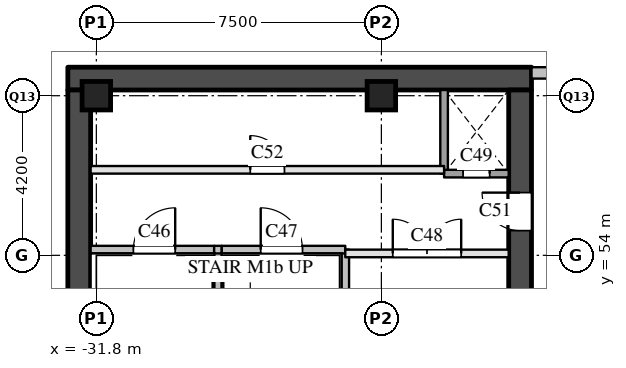
"""IFC4 building model, lengths in metres.
Left out: names, types, materials, properties, quantities, classifications, styles, units other than length and angle.
Written with IfcOpenShell. Run it as: python <this file> out.ifc"""

import sys

from ifc_helpers import new_model, si_unit, direction, frame, frame_2d, origin, origin_2d, place, context, subcontext, project, spatial, rectangle, extrude, element, fill, save


model = new_model("IFC4")
c1 = context("Model", 3, precision=1e-05, world=origin(), true_north=direction((0.0, 1.0)))
c2 = subcontext(c1, "Body", "Model", "MODEL_VIEW")
j1 = project(units=[si_unit("LENGTHUNIT", "METRE"), si_unit("PLANEANGLEUNIT", "RADIAN")], contexts=[c1])
p1 = place(None, origin())
s1 = spatial("IfcSite", under=j1, at=p1, CompositionType="ELEMENT")
p2 = place(p1, origin())
s2 = spatial("IfcBuilding", under=s1, at=p2, CompositionType="ELEMENT")
p3 = place(p2, frame((0.0, 0.0, 21.0)))
s3 = spatial("IfcBuildingStorey", under=s2, at=p3, CompositionType="ELEMENT", Elevation=21.0)
for number, where, z_axis, x_axis in (
    (1, (-31.8, 58.2, 0.0), (0.0, 0.0, 1.0), (1.0, 0.0, 0.0)),
    (2, (-24.3, 58.2, 0.0), (0.0, 0.0, 1.0), (1.0, 0.0, 0.0)),
):
    element("IfcColumn", number, at=place(p3, frame(where, z_axis=z_axis, x_axis=x_axis)), inside=s3, PredefinedType="COLUMN", context=c2, shape_type="SweptSolid", body=[
        extrude(rectangle(XDim=0.75, YDim=0.75, at=origin_2d()), origin(), (0.0, 0.0, 1.0), 5.0),
    ])
p4 = place(p3, frame((-16.8, 58.8, 0.0), z_axis=(0.0, 0.0, 1.0), x_axis=(-1.0, 0.0, 0.0)))
e3 = element("IfcWall", 3, at=p4, inside=s3, PredefinedType="SOLIDWALL", context=c2, shape_type="SweptSolid", body=[
    extrude(rectangle(XDim=3.55, YDim=0.3, at=frame_2d((1.775, 0.0))), origin(), (0.0, 0.0, 1.0), 4.59),
])
p5 = place(p3, frame((-32.55, 58.65, 0.0), z_axis=(0.0, 0.0, 1.0), x_axis=(1.0, 0.0, 0.0)))
e4 = element("IfcWall", 4, at=p5, inside=s3, PredefinedType="SHEAR", context=c2, shape_type="SweptSolid", body=[
    extrude(rectangle(XDim=12.2, YDim=0.6, at=frame_2d((6.1, 0.0))), origin(), (0.0, 0.0, 1.0), 4.55),
])
p6 = place(p3, frame((-32.25, 47.95, 0.0), z_axis=(0.0, 0.0, 1.0), x_axis=(0.0, 1.0, 0.0)))
e5 = element("IfcWall", 5, at=p6, inside=s3, PredefinedType="SHEAR", context=c2, shape_type="SweptSolid", body=[
    extrude(rectangle(XDim=10.4, YDim=0.6, at=frame_2d((5.2, 0.0))), origin(), (0.0, 0.0, 1.0), 4.55),
])
p7 = place(p3, frame((-20.65, 47.95, 0.0), z_axis=(0.0, 0.0, 1.0), x_axis=(0.0, 1.0, 0.0)))
e6 = element("IfcWall", 6, at=p7, inside=s3, PredefinedType="SHEAR", context=c2, shape_type="SweptSolid", body=[
    extrude(rectangle(XDim=10.4, YDim=0.6, at=frame_2d((5.2, 0.0))), origin(), (0.0, 0.0, 1.0), 4.55),
])
p8 = place(p7, frame((6.7, 0.0, 0.0)))
e7 = element("IfcOpeningElement", 7, at=p8, cuts=e6, PredefinedType="OPENING", context=c2, shape_type="SweptSolid", body=[
    extrude(rectangle(XDim=1.0, YDim=2.1, at=frame_2d((0.5, 1.05))), frame((0.0, 0.31, 0.0), z_axis=(0.0, -1.0, 0.0), x_axis=(1.0, 0.0, 0.0)), (0.0, 0.0, 1.0), 0.62),
])
for number, where, z_axis, x_axis in (
    (8, (-28.6, 52.55, 0.0), (0.0, 0.0, 1.0), (0.0, 1.0, 0.0)),
    (9, (-25.25, 52.55, 0.0), (0.0, 0.0, 1.0), (0.0, 1.0, 0.0)),
):
    element("IfcWall", number, at=place(p3, frame(where, z_axis=z_axis, x_axis=x_axis)), inside=s3, PredefinedType="SOLIDWALL", context=c2, shape_type="SweptSolid", body=[
        extrude(rectangle(XDim=1.6, YDim=0.2, at=frame_2d((0.8, 0.0))), origin(), (0.0, 0.0, 1.0), 4.55),
    ])
p9 = place(p3, frame((-22.65, 56.15, 0.0), z_axis=(0.0, 0.0, 1.0), x_axis=(0.0, 1.0, 0.0)))
e10 = element("IfcWall", 10, at=p9, inside=s3, PredefinedType="SOLIDWALL", context=c2, shape_type="SweptSolid", body=[
    extrude(rectangle(XDim=2.2, YDim=0.2, at=frame_2d((1.1, 0.0))), origin(), (0.0, 0.0, 1.0), 4.55),
])
p10 = place(p3, frame((-25.25, 54.05, 0.0), z_axis=(0.0, 0.0, 1.0), x_axis=(1.0, 0.0, 0.0)))
e11 = element("IfcWall", 11, at=p10, inside=s3, PredefinedType="PARTITIONING", context=c2, shape_type="SweptSolid", body=[
    extrude(rectangle(XDim=4.3, YDim=0.2, at=frame_2d((2.15, 0.0))), origin(), (0.0, 0.0, 1.0), 4.55),
])
p11 = place(p10, frame((1.25, 0.0, 0.0)))
e12 = element("IfcOpeningElement", 12, at=p11, cuts=e11, PredefinedType="OPENING", context=c2, shape_type="SweptSolid", body=[
    extrude(rectangle(XDim=1.8, YDim=2.1, at=frame_2d((0.9, 1.05))), frame((0.0, 0.11, 0.0), z_axis=(0.0, -1.0, 0.0), x_axis=(1.0, 0.0, 0.0)), (0.0, 0.0, 1.0), 0.22),
])
p12 = place(p3, frame((-31.95, 54.15, 0.0), z_axis=(0.0, 0.0, 1.0), x_axis=(1.0, 0.0, 0.0)))
e13 = element("IfcWall", 13, at=p12, inside=s3, PredefinedType="SOLIDWALL", context=c2, shape_type="SweptSolid", body=[
    extrude(rectangle(XDim=3.25, YDim=0.2, at=frame_2d((1.625, 0.0))), origin(), (0.0, 0.0, 1.0), 4.55),
])
p13 = place(p12, frame((1.125, 0.0, 0.0)))
e14 = element("IfcOpeningElement", 14, at=p13, cuts=e13, PredefinedType="OPENING", context=c2, shape_type="SweptSolid", body=[
    extrude(rectangle(XDim=1.1, YDim=2.1, at=frame_2d((0.55, 1.05))), frame((0.0, 0.11, 0.0), z_axis=(0.0, -1.0, 0.0), x_axis=(1.0, 0.0, 0.0)), (0.0, 0.0, 1.0), 0.22),
])
p14 = place(p3, frame((-28.7, 54.15, 0.0), z_axis=(0.0, 0.0, 1.0), x_axis=(1.0, 0.0, 0.0)))
e15 = element("IfcWall", 15, at=p14, inside=s3, PredefinedType="SOLIDWALL", context=c2, shape_type="SweptSolid", body=[
    extrude(rectangle(XDim=0.2, YDim=0.2, at=frame_2d((0.1, 0.0))), origin(), (0.0, 0.0, 1.0), 4.55),
])
p15 = place(p3, frame((-28.5, 54.15, 0.0), z_axis=(0.0, 0.0, 1.0), x_axis=(1.0, 0.0, 0.0)))
e16 = element("IfcWall", 16, at=p15, inside=s3, PredefinedType="SOLIDWALL", context=c2, shape_type="SweptSolid", body=[
    extrude(rectangle(XDim=3.25, YDim=0.2, at=frame_2d((1.625, 0.0))), origin(), (0.0, 0.0, 1.0), 4.55),
])
p16 = place(p15, frame((1.025, 0.0, 0.0)))
e17 = element("IfcOpeningElement", 17, at=p16, cuts=e16, PredefinedType="OPENING", context=c2, shape_type="SweptSolid", body=[
    extrude(rectangle(XDim=1.1, YDim=2.1, at=frame_2d((0.55, 1.05))), frame((0.0, 0.11, 0.0), z_axis=(0.0, -1.0, 0.0), x_axis=(1.0, 0.0, 0.0)), (0.0, 0.0, 1.0), 0.22),
])
p17 = place(p3, frame((-31.95, 56.25, 0.0), z_axis=(0.0, 0.0, 1.0), x_axis=(1.0, 0.0, 0.0)))
e18 = element("IfcWall", 18, at=p17, inside=s3, PredefinedType="PARTITIONING", context=c2, shape_type="SweptSolid", body=[
    extrude(rectangle(XDim=9.3, YDim=0.2, at=frame_2d((4.65, 0.0))), origin(), (0.0, 0.0, 1.0), 4.55),
])
p18 = place(p17, frame((4.2, 0.0, 0.0)))
e19 = element("IfcOpeningElement", 19, at=p18, cuts=e18, PredefinedType="OPENING", context=c2, shape_type="SweptSolid", body=[
    extrude(rectangle(XDim=0.9, YDim=2.1, at=frame_2d((0.45, 1.05))), frame((0.0, 0.11, 0.0), z_axis=(0.0, -1.0, 0.0), x_axis=(1.0, 0.0, 0.0)), (0.0, 0.0, 1.0), 0.22),
])
p19 = place(p3, frame((-22.65, 56.15, 0.0), z_axis=(0.0, 0.0, 1.0), x_axis=(1.0, 0.0, 0.0)))
e20 = element("IfcWall", 20, at=p19, inside=s3, PredefinedType="SOLIDWALL", context=c2, shape_type="SweptSolid", body=[
    extrude(rectangle(XDim=1.7, YDim=0.2, at=frame_2d((0.85, 0.0))), origin(), (0.0, 0.0, 1.0), 4.55),
])
p20 = place(p19, frame((0.5, 0.0, 0.0)))
e21 = element("IfcOpeningElement", 21, at=p20, cuts=e20, PredefinedType="OPENING", context=c2, shape_type="SweptSolid", body=[
    extrude(rectangle(XDim=0.7, YDim=2.1, at=frame_2d((0.35, 1.05))), frame((0.0, 0.11, 0.0), z_axis=(0.0, -1.0, 0.0), x_axis=(1.0, 0.0, 0.0)), (0.0, 0.0, 1.0), 0.22),
])
p21 = place(p13, origin())
e22 = element("IfcDoor", 22, at=p21, inside=s3, OperationType="SINGLE_SWING_RIGHT", PredefinedType="DOOR", context=c2, shape_type="SweptSolid", body=[
    extrude(rectangle(XDim=1.1, YDim=2.1, at=frame_2d((0.55, 1.05))), frame((0.0, 0.025, 0.0), z_axis=(0.0, -1.0, 0.0), x_axis=(1.0, 0.0, 0.0)), (0.0, 0.0, 1.0), 0.05),
])
fill(e14, e22)
p22 = place(p16, origin())
e23 = element("IfcDoor", 23, at=p22, inside=s3, OperationType="SINGLE_SWING_LEFT", PredefinedType="DOOR", context=c2, shape_type="SweptSolid", body=[
    extrude(rectangle(XDim=1.1, YDim=2.1, at=frame_2d((0.55, 1.05))), frame((0.0, 0.025, 0.0), z_axis=(0.0, -1.0, 0.0), x_axis=(1.0, 0.0, 0.0)), (0.0, 0.0, 1.0), 0.05),
])
fill(e17, e23)
p23 = place(p11, origin())
e24 = element("IfcDoor", 24, at=p23, inside=s3, OperationType="DOUBLE_DOOR_SINGLE_SWING", PredefinedType="DOOR", context=c2, shape_type="SweptSolid", body=[
    extrude(rectangle(XDim=1.8, YDim=2.1, at=frame_2d((0.9, 1.05))), frame((0.0, 0.025, 0.0), z_axis=(0.0, -1.0, 0.0), x_axis=(1.0, 0.0, 0.0)), (0.0, 0.0, 1.0), 0.05),
])
fill(e12, e24)
p24 = place(p20, origin())
e25 = element("IfcDoor", 25, at=p24, inside=s3, OperationType="SINGLE_SWING_RIGHT", PredefinedType="DOOR", context=c2, shape_type="SweptSolid", body=[
    extrude(rectangle(XDim=0.7, YDim=2.1, at=frame_2d((0.35, 1.05))), frame((0.0, 0.025, 0.0), z_axis=(0.0, -1.0, 0.0), x_axis=(1.0, 0.0, 0.0)), (0.0, 0.0, 1.0), 0.05),
])
fill(e21, e25)
p25 = place(p8, origin())
e26 = element("IfcDoor", 26, at=p25, inside=s3, OperationType="SINGLE_SWING_RIGHT", PredefinedType="DOOR", context=c2, shape_type="SweptSolid", body=[
    extrude(rectangle(XDim=1.0, YDim=2.1, at=frame_2d((0.5, 1.05))), frame((0.0, 0.025, 0.0), z_axis=(0.0, -1.0, 0.0), x_axis=(1.0, 0.0, 0.0)), (0.0, 0.0, 1.0), 0.05),
])
fill(e7, e26)
p26 = place(p18, origin())
e27 = element("IfcDoor", 27, at=p26, inside=s3, OperationType="SINGLE_SWING_LEFT", PredefinedType="DOOR", context=c2, shape_type="SweptSolid", body=[
    extrude(rectangle(XDim=0.9, YDim=2.1, at=frame_2d((0.45, 1.05))), frame((0.0, 0.025, 0.0), z_axis=(0.0, -1.0, 0.0), x_axis=(1.0, 0.0, 0.0)), (0.0, 0.0, 1.0), 0.05),
])
fill(e19, e27)
save(model, sys.argv[1])
